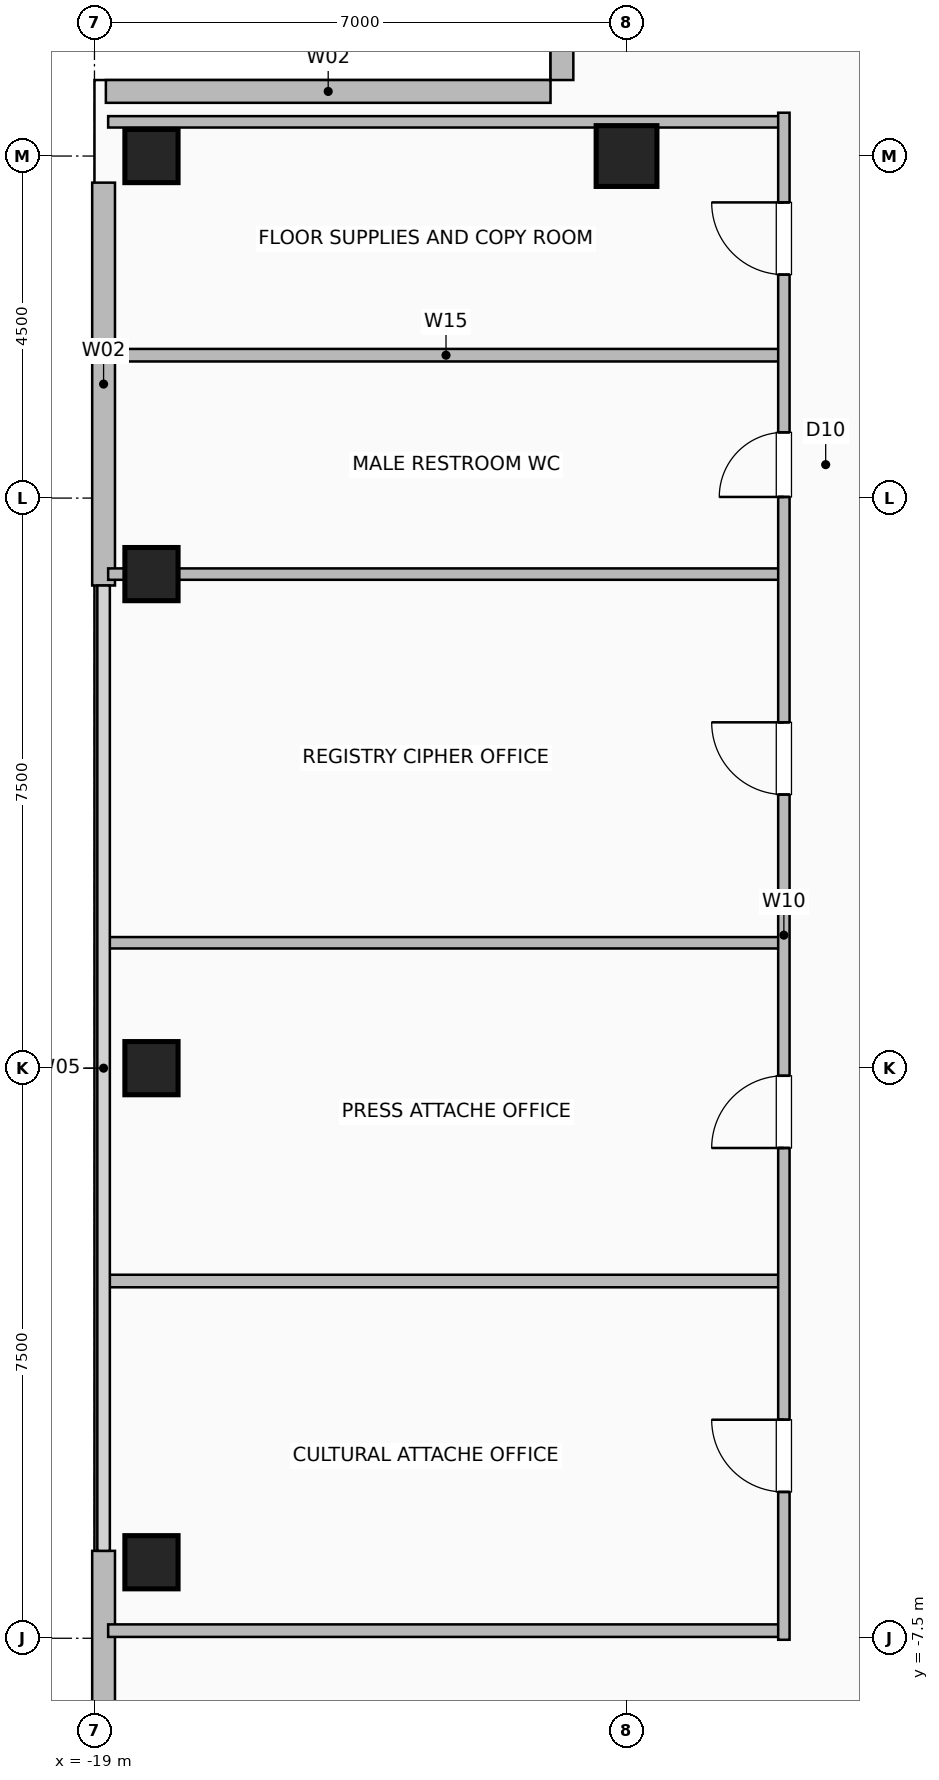
"""IFC4 building model, lengths in metres.
Left out: names, types, materials, properties, quantities, classifications, styles, units other than length and angle.
Written with IfcOpenShell. Run it as: python <this file> out.ifc"""

import sys

from ifc_helpers import new_model, si_unit, direction, frame, frame_2d, origin, origin_2d, place, context, subcontext, project, spatial, rectangle, hollow_rectangle, extrude, element, fill, save


model = new_model("IFC4")
c1 = context("Model", 3, precision=1e-05, world=origin(), true_north=direction((0.0, 1.0)))
c2 = subcontext(c1, "Body", "Model", "MODEL_VIEW")
j1 = project(units=[si_unit("LENGTHUNIT", "METRE"), si_unit("PLANEANGLEUNIT", "RADIAN")], contexts=[c1])
p1 = place(None, origin())
s1 = spatial("IfcSite", under=j1, at=p1, CompositionType="ELEMENT")
p2 = place(p1, origin())
s2 = spatial("IfcBuilding", under=s1, at=p2, CompositionType="ELEMENT")
p3 = place(p2, frame((0.0, 0.0, 236.0)))
s3 = spatial("IfcBuildingStorey", under=s2, at=p3, CompositionType="ELEMENT", Elevation=236.0)
for number, where, z_axis, x_axis in (
    (1, (-18.25, -6.5, 0.0), (0.0, 0.0, 1.0), (1.0, 0.0, 0.0)),
    (2, (-18.25, 0.0, 0.0), (0.0, 0.0, 1.0), (1.0, 0.0, 0.0)),
    (3, (-18.25, 6.5, 0.0), (0.0, 0.0, 1.0), (1.0, 0.0, 0.0)),
    (4, (-18.25, 12.0, 0.0), (0.0, 0.0, 1.0), (1.0, 0.0, 0.0)),
):
    element("IfcColumn", number, at=place(p3, frame(where, z_axis=z_axis, x_axis=x_axis)), inside=s3, PredefinedType="COLUMN", context=c2, shape_type="SweptSolid", body=[
        extrude(hollow_rectangle(XDim=0.7, YDim=0.7, WallThickness=0.035, at=origin_2d()), origin(), (0.0, 0.0, 1.0), 3.6),
    ])
p4 = place(p3, frame((-12.0, 12.0, 0.0), z_axis=(0.0, 0.0, 1.0), x_axis=(1.0, 0.0, 0.0)))
e5 = element("IfcColumn", 5, at=p4, inside=s3, PredefinedType="COLUMN", context=c2, shape_type="SweptSolid", body=[
    extrude(hollow_rectangle(XDim=0.8, YDim=0.8, WallThickness=0.04, at=origin_2d()), origin(), (0.0, 0.0, 1.0), 3.6),
])
for number, where, z_axis, x_axis in (
    (6, (-18.88, -11.65, 0.0), (0.0, 0.0, 1.0), (0.0, 1.0, 0.0)),
    (7, (-18.88, 6.35, 0.0), (0.0, 0.0, 1.0), (0.0, 1.0, 0.0)),
):
    element("IfcWall", number, at=place(p3, frame(where, z_axis=z_axis, x_axis=x_axis)), inside=s3, PredefinedType="SOLIDWALL", context=c2, shape_type="SweptSolid", body=[
        extrude(rectangle(XDim=5.3, YDim=0.3, at=frame_2d((2.65, 0.0))), origin(), (0.0, 0.0, 1.0), 3.36),
    ])
p5 = place(p3, frame((-12.85, 18.85, 0.0), z_axis=(0.0, 0.0, 1.0), x_axis=(0.0, -1.0, 0.0)))
e8 = element("IfcWall", 8, at=p5, inside=s3, PredefinedType="SOLIDWALL", context=c2, shape_type="SweptSolid", body=[
    extrude(rectangle(XDim=5.85, YDim=0.3, at=frame_2d((2.925, 0.0))), origin(), (0.0, 0.0, 1.0), 3.36),
])
p6 = place(p5, frame((2.175, 0.0, 0.9)))
e9 = element("IfcOpeningElement", 9, at=p6, cuts=e8, PredefinedType="OPENING", context=c2, shape_type="SweptSolid", body=[
    extrude(rectangle(XDim=1.5, YDim=1.8, at=frame_2d((0.75, 0.9))), frame((0.0, 0.16, 0.0), z_axis=(0.0, -1.0, 0.0), x_axis=(1.0, 0.0, 0.0)), (0.0, 0.0, 1.0), 0.32),
])
p7 = place(p3, frame((-18.85, 12.85, 0.0), z_axis=(0.0, 0.0, 1.0), x_axis=(1.0, 0.0, 0.0)))
e10 = element("IfcWall", 10, at=p7, inside=s3, PredefinedType="SOLIDWALL", context=c2, shape_type="SweptSolid", body=[
    extrude(rectangle(XDim=5.85, YDim=0.3, at=frame_2d((2.925, 0.0))), origin(), (0.0, 0.0, 1.0), 3.36),
])
for number, where, z_axis, x_axis in (
    (11, (-18.82, 9.38, 0.0), (0.0, 0.0, 1.0), (1.0, 0.0, 0.0)),
    (12, (-18.82, -7.4, 0.0), (0.0, 0.0, 1.0), (1.0, 0.0, 0.0)),
    (13, (-18.82, -2.8, 0.0), (0.0, 0.0, 1.0), (1.0, 0.0, 0.0)),
):
    element("IfcWall", number, at=place(p3, frame(where, z_axis=z_axis, x_axis=x_axis)), inside=s3, PredefinedType="PLUMBINGWALL", context=c2, shape_type="SweptSolid", body=[
        extrude(rectangle(XDim=8.89, YDim=0.165, at=frame_2d((4.445, 0.0))), origin(), (0.0, 0.0, 1.0), 3.36),
    ])
for number, where, z_axis, x_axis in (
    (14, (-18.82, 1.65, 0.0), (0.0, 0.0, 1.0), (1.0, 0.0, 0.0)),
    (15, (-18.82, 6.5, 0.0), (0.0, 0.0, 1.0), (1.0, 0.0, 0.0)),
    (16, (-18.82, 12.45, 0.0), (0.0, 0.0, 1.0), (1.0, 0.0, 0.0)),
):
    element("IfcWall", number, at=place(p3, frame(where, z_axis=z_axis, x_axis=x_axis)), inside=s3, PredefinedType="PARTITIONING", context=c2, shape_type="SweptSolid", body=[
        extrude(rectangle(XDim=8.89, YDim=0.15, at=frame_2d((4.445, 0.0))), origin(), (0.0, 0.0, 1.0), 3.36),
    ])
p8 = place(p3, frame((-9.93, -7.52, 0.0), z_axis=(0.0, 0.0, 1.0), x_axis=(0.0, 1.0, 0.0)))
e17 = element("IfcWall", 17, at=p8, inside=s3, PredefinedType="PARTITIONING", context=c2, shape_type="SweptSolid", body=[
    extrude(rectangle(XDim=20.09, YDim=0.15, at=frame_2d((10.045, 0.0))), origin(), (0.0, 0.0, 1.0), 3.36),
])
p9 = place(p8, frame((1.945, 0.0, 0.0)))
e18 = element("IfcOpeningElement", 18, at=p9, cuts=e17, PredefinedType="OPENING", context=c2, shape_type="SweptSolid", body=[
    extrude(rectangle(XDim=0.95, YDim=2.06, at=frame_2d((0.475, 1.03))), frame((0.0, 0.085, 0.0), z_axis=(0.0, -1.0, 0.0), x_axis=(1.0, 0.0, 0.0)), (0.0, 0.0, 1.0), 0.17),
])
p10 = place(p8, frame((6.47, 0.0, 0.0)))
e19 = element("IfcOpeningElement", 19, at=p10, cuts=e17, PredefinedType="OPENING", context=c2, shape_type="SweptSolid", body=[
    extrude(rectangle(XDim=0.95, YDim=2.06, at=frame_2d((0.475, 1.03))), frame((0.0, 0.085, 0.0), z_axis=(0.0, -1.0, 0.0), x_axis=(1.0, 0.0, 0.0)), (0.0, 0.0, 1.0), 0.17),
])
p11 = place(p8, frame((11.12, 0.0, 0.0)))
e20 = element("IfcOpeningElement", 20, at=p11, cuts=e17, PredefinedType="OPENING", context=c2, shape_type="SweptSolid", body=[
    extrude(rectangle(XDim=0.95, YDim=2.06, at=frame_2d((0.475, 1.03))), frame((0.0, 0.085, 0.0), z_axis=(0.0, -1.0, 0.0), x_axis=(1.0, 0.0, 0.0)), (0.0, 0.0, 1.0), 0.17),
])
p12 = place(p8, frame((15.035, 0.0, 0.0)))
e21 = element("IfcOpeningElement", 21, at=p12, cuts=e17, PredefinedType="OPENING", context=c2, shape_type="SweptSolid", body=[
    extrude(rectangle(XDim=0.85, YDim=2.05, at=frame_2d((0.425, 1.025))), frame((0.0, 0.085, 0.0), z_axis=(0.0, -1.0, 0.0), x_axis=(1.0, 0.0, 0.0)), (0.0, 0.0, 1.0), 0.17),
])
p13 = place(p8, frame((17.96, 0.0, 0.0)))
e22 = element("IfcOpeningElement", 22, at=p13, cuts=e17, PredefinedType="OPENING", context=c2, shape_type="SweptSolid", body=[
    extrude(rectangle(XDim=0.95, YDim=2.06, at=frame_2d((0.475, 1.03))), frame((0.0, 0.085, 0.0), z_axis=(0.0, -1.0, 0.0), x_axis=(1.0, 0.0, 0.0)), (0.0, 0.0, 1.0), 0.17),
])
p14 = place(p9, origin())
e23 = element("IfcDoor", 23, at=p14, inside=s3, OperationType="SINGLE_SWING_RIGHT", PredefinedType="DOOR", context=c2, shape_type="SweptSolid", body=[
    extrude(rectangle(XDim=0.95, YDim=2.06, at=frame_2d((0.475, 1.03))), frame((0.0, 0.025, 0.0), z_axis=(0.0, -1.0, 0.0), x_axis=(1.0, 0.0, 0.0)), (0.0, 0.0, 1.0), 0.05),
])
fill(e18, e23)
p15 = place(p10, origin())
e24 = element("IfcDoor", 24, at=p15, inside=s3, OperationType="SINGLE_SWING_LEFT", PredefinedType="DOOR", context=c2, shape_type="SweptSolid", body=[
    extrude(rectangle(XDim=0.95, YDim=2.06, at=frame_2d((0.475, 1.03))), frame((0.0, 0.025, 0.0), z_axis=(0.0, -1.0, 0.0), x_axis=(1.0, 0.0, 0.0)), (0.0, 0.0, 1.0), 0.05),
])
fill(e19, e24)
p16 = place(p11, origin())
e25 = element("IfcDoor", 25, at=p16, inside=s3, OperationType="SINGLE_SWING_RIGHT", PredefinedType="DOOR", context=c2, shape_type="SweptSolid", body=[
    extrude(rectangle(XDim=0.95, YDim=2.06, at=frame_2d((0.475, 1.03))), frame((0.0, 0.025, 0.0), z_axis=(0.0, -1.0, 0.0), x_axis=(1.0, 0.0, 0.0)), (0.0, 0.0, 1.0), 0.05),
])
fill(e20, e25)
p17 = place(p12, origin())
e26 = element("IfcDoor", 26, at=p17, inside=s3, OperationType="SINGLE_SWING_LEFT", PredefinedType="DOOR", context=c2, shape_type="SweptSolid", body=[
    extrude(rectangle(XDim=0.85, YDim=2.05, at=frame_2d((0.425, 1.025))), frame((0.0, 0.025, 0.0), z_axis=(0.0, -1.0, 0.0), x_axis=(1.0, 0.0, 0.0)), (0.0, 0.0, 1.0), 0.05),
])
fill(e21, e26)
p18 = place(p13, origin())
e27 = element("IfcDoor", 27, at=p18, inside=s3, OperationType="SINGLE_SWING_RIGHT", PredefinedType="DOOR", context=c2, shape_type="SweptSolid", body=[
    extrude(rectangle(XDim=0.95, YDim=2.06, at=frame_2d((0.475, 1.03))), frame((0.0, 0.025, 0.0), z_axis=(0.0, -1.0, 0.0), x_axis=(1.0, 0.0, 0.0)), (0.0, 0.0, 1.0), 0.05),
])
fill(e22, e27)
save(model, sys.argv[1])
